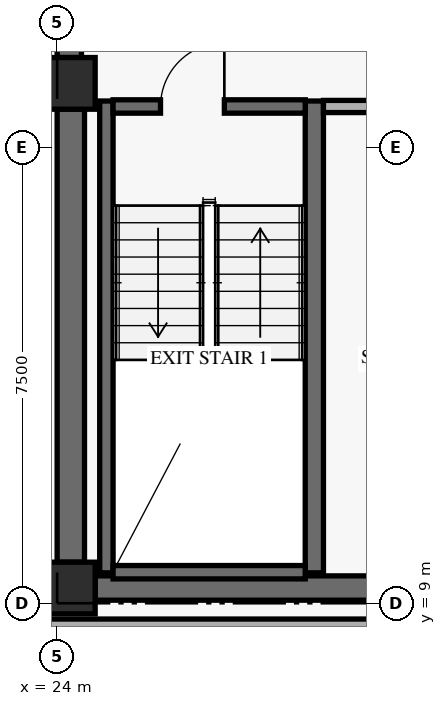
"""IFC4 building model, lengths in metres.
Left out: names, types, materials, properties, quantities, classifications, styles, units other than length and angle.
Written with IfcOpenShell. Run it as: python <this file> out.ifc"""

import sys

from ifc_helpers import new_model, si_unit, direction, frame, frame_2d, origin, origin_2d, place, context, subcontext, project, spatial, rectangle, extrude, element, fill, save


model = new_model("IFC4")
c1 = context("Model", 3, precision=1e-05, world=origin(), true_north=direction((0.0, 1.0)))
c2 = subcontext(c1, "Body", "Model", "MODEL_VIEW")
j1 = project(units=[si_unit("LENGTHUNIT", "METRE"), si_unit("PLANEANGLEUNIT", "RADIAN")], contexts=[c1])
p1 = place(None, origin())
s1 = spatial("IfcSite", under=j1, at=p1, CompositionType="ELEMENT")
p2 = place(p1, origin())
s2 = spatial("IfcBuilding", under=s1, at=p2, CompositionType="ELEMENT")
p3 = place(p2, frame((0.0, 0.0, 128.4)))
s3 = spatial("IfcBuildingStorey", under=s2, at=p3, CompositionType="ELEMENT", Elevation=128.4)
p4 = place(p3, frame((24.225, 9.675, 0.0), z_axis=(0.0, 0.0, 1.0), x_axis=(0.0, 1.0, 0.0)))
e1 = element("IfcWall", 1, at=p4, inside=s3, PredefinedType="SHEAR", context=c2, shape_type="SweptSolid", body=[
    extrude(rectangle(XDim=7.45, YDim=0.45, at=frame_2d((3.725, 0.0))), origin(), (0.0, 0.0, 1.0), 2.749),
])
p5 = place(p3, frame((24.2, 17.975, 0.0), z_axis=(0.0, 0.0, 1.0), x_axis=(0.0, 1.0, 0.0)))
e2 = element("IfcWall", 2, at=p5, inside=s3, PredefinedType="SHEAR", context=c2, shape_type="SweptSolid", body=[
    extrude(rectangle(XDim=11.8, YDim=0.4, at=frame_2d((5.9, 0.0))), origin(), (0.0, 0.0, 1.0), 2.749),
])
p6 = place(p3, frame((24.625, 9.25, 0.0), z_axis=(0.0, 0.0, 1.0), x_axis=(1.0, 0.0, 0.0)))
e3 = element("IfcWall", 3, at=p6, inside=s3, PredefinedType="SHEAR", context=c2, shape_type="SweptSolid", body=[
    extrude(rectangle(XDim=10.15, YDim=0.4, at=frame_2d((5.075, 0.0))), origin(), (0.0, 0.0, 1.0), 3.36),
])
p7 = place(p6, frame((5.2, 0.0, 0.0)))
e4 = element("IfcOpeningElement", 4, at=p7, cuts=e3, PredefinedType="OPENING", context=c2, shape_type="SweptSolid", body=[
    extrude(rectangle(XDim=1.05, YDim=2.15, at=frame_2d((0.525, 1.075))), frame((0.0, 0.21, 0.0), z_axis=(0.0, -1.0, 0.0), x_axis=(1.0, 0.0, 0.0)), (0.0, 0.0, 1.0), 0.42),
])
p8 = place(p3, frame((24.81, 9.5, 0.0), z_axis=(0.0, 0.0, 1.0), x_axis=(0.0, 1.0, 0.0)))
e5 = element("IfcWall", 5, at=p8, inside=s3, PredefinedType="SHEAR", context=c2, shape_type="SweptSolid", body=[
    extrude(rectangle(XDim=7.76, YDim=0.22, at=frame_2d((3.88, 0.0))), origin(), (0.0, 0.0, 1.0), 3.36),
])
p9 = place(p3, frame((28.23, 9.5, 0.0), z_axis=(0.0, 0.0, 1.0), x_axis=(0.0, 1.0, 0.0)))
e6 = element("IfcWall", 6, at=p9, inside=s3, PredefinedType="SHEAR", context=c2, shape_type="SweptSolid", body=[
    extrude(rectangle(XDim=7.76, YDim=0.3, at=frame_2d((3.88, 0.0))), origin(), (0.0, 0.0, 1.0), 3.36),
])
p10 = place(p3, frame((24.92, 9.51, 0.0), z_axis=(0.0, 0.0, 1.0), x_axis=(1.0, 0.0, 0.0)))
e7 = element("IfcWall", 7, at=p10, inside=s3, PredefinedType="SHEAR", context=c2, shape_type="SweptSolid", body=[
    extrude(rectangle(XDim=3.16, YDim=0.22, at=frame_2d((1.58, 0.0))), origin(), (0.0, 0.0, 1.0), 3.36),
])
p11 = place(p3, frame((24.92, 17.17, 0.0), z_axis=(0.0, 0.0, 1.0), x_axis=(1.0, 0.0, 0.0)))
e8 = element("IfcWall", 8, at=p11, inside=s3, PredefinedType="SHEAR", context=c2, shape_type="SweptSolid", body=[
    extrude(rectangle(XDim=3.16, YDim=0.22, at=frame_2d((1.58, 0.0))), origin(), (0.0, 0.0, 1.0), 3.36),
])
p12 = place(p11, frame((0.78, 0.0, 0.0)))
e9 = element("IfcOpeningElement", 9, at=p12, cuts=e8, PredefinedType="OPENING", context=c2, shape_type="SweptSolid", body=[
    extrude(rectangle(XDim=1.05, YDim=2.15, at=frame_2d((0.525, 1.075))), frame((0.0, 0.12, 0.0), z_axis=(0.0, -1.0, 0.0), x_axis=(1.0, 0.0, 0.0)), (0.0, 0.0, 1.0), 0.24),
])
for number, where, z_axis, x_axis in (
    (10, (24.2, 9.25, 0.0), (0.0, 0.0, 1.0), (1.0, 0.0, 0.0)),
    (11, (24.2, 17.55, 0.0), (0.0, 0.0, 1.0), (1.0, 0.0, 0.0)),
):
    element("IfcColumn", number, at=place(p3, frame(where, z_axis=z_axis, x_axis=x_axis)), inside=s3, PredefinedType="COLUMN", context=c2, shape_type="SweptSolid", body=[
        extrude(rectangle(XDim=0.85, YDim=0.85, at=origin_2d()), origin(), (0.0, 0.0, 1.0), 3.6),
    ])
p13 = place(p3, frame((28.38, 17.17, 0.0), z_axis=(0.0, 0.0, 1.0), x_axis=(1.0, 0.0, 0.0)))
e12 = element("IfcWall", 12, at=p13, inside=s3, PredefinedType="STANDARD", context=c2, shape_type="SweptSolid", body=[
    extrude(rectangle(XDim=2.9, YDim=0.2, at=frame_2d((1.45, 0.0))), origin(), (0.0, 0.0, 1.0), 3.36),
])
p14 = place(p3, frame((23.85, 8.65, 0.0), z_axis=(0.0, 0.0, 1.0), x_axis=(1.0, 0.0, 0.0)))
e13 = element("IfcWall", 13, at=p14, inside=s3, PredefinedType="STANDARD", context=c2, shape_type="SweptSolid", body=[
    extrude(rectangle(XDim=11.57, YDim=0.18, at=frame_2d((5.785, 0.0))), origin(), (0.0, 0.0, 1.0), 2.731),
])
p15 = place(p12, frame((1.05, 0.0, 0.0), z_axis=(0.0, 0.0, 1.0), x_axis=(-1.0, 0.0, 0.0)))
e14 = element("IfcDoor", 14, at=p15, inside=s3, OperationType="SINGLE_SWING_LEFT", PredefinedType="DOOR", context=c2, shape_type="SweptSolid", body=[
    extrude(rectangle(XDim=1.05, YDim=2.15, at=frame_2d((0.525, 1.075))), frame((0.0, 0.025, 0.0), z_axis=(0.0, -1.0, 0.0), x_axis=(1.0, 0.0, 0.0)), (0.0, 0.0, 1.0), 0.05),
])
fill(e9, e14)
save(model, sys.argv[1])
